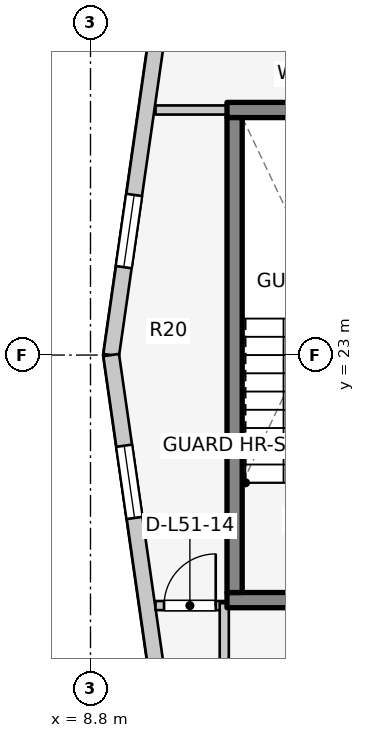
"""IFC4 building model, lengths in metres.
Left out: names, types, materials, properties, quantities, classifications, styles, units other than length and angle.
Written with IfcOpenShell. Run it as: python <this file> out.ifc"""

import sys

from ifc_helpers import new_model, si_unit, direction, frame, frame_2d, origin, place, context, subcontext, project, spatial, rectangle, extrude, element, fill, save


model = new_model("IFC4")
c1 = context("Model", 3, precision=1e-05, world=origin(), true_north=direction((0.0, 1.0)))
c2 = subcontext(c1, "Body", "Model", "MODEL_VIEW")
j1 = project(units=[si_unit("LENGTHUNIT", "METRE"), si_unit("PLANEANGLEUNIT", "RADIAN")], contexts=[c1])
p1 = place(None, origin())
s1 = spatial("IfcSite", under=j1, at=p1, CompositionType="ELEMENT")
p2 = place(p1, origin())
s2 = spatial("IfcBuilding", under=s1, at=p2, CompositionType="ELEMENT")
p3 = place(p2, frame((0.0, 0.0, 168.4)))
s3 = spatial("IfcBuildingStorey", under=s2, at=p3, CompositionType="ELEMENT", Elevation=168.4)
p4 = place(p3, frame((11.045, 18.97, 0.0), z_axis=(0.0, 0.0, 1.0), x_axis=(1.0, 0.0, 0.0)))
e1 = element("IfcWall", 1, at=p4, inside=s3, PredefinedType="SOLIDWALL", context=c2, shape_type="SweptSolid", body=[
    extrude(rectangle(XDim=3.782, YDim=0.25, at=frame_2d((1.891, 0.0))), origin(), (0.0, 0.0, 1.0), 3.1),
])
p5 = place(p4, frame((1.135, 0.0, 0.0)))
e2 = element("IfcOpeningElement", 2, at=p5, cuts=e1, PredefinedType="OPENING", context=c2, shape_type="SweptSolid", body=[
    extrude(rectangle(XDim=1.1, YDim=2.1, at=frame_2d((0.55, 1.05))), frame((0.0, 0.135, 0.0), z_axis=(0.0, -1.0, 0.0), x_axis=(1.0, 0.0, 0.0)), (0.0, 0.0, 1.0), 0.27),
])
p6 = place(p3, frame((11.045, 27.03, 0.0), z_axis=(0.0, 0.0, 1.0), x_axis=(1.0, 0.0, 0.0)))
e3 = element("IfcWall", 3, at=p6, inside=s3, PredefinedType="SOLIDWALL", context=c2, shape_type="SweptSolid", body=[
    extrude(rectangle(XDim=3.782, YDim=0.25, at=frame_2d((1.891, 0.0))), origin(), (0.0, 0.0, 1.0), 3.1),
])
p7 = place(p3, frame((11.17, 19.095, 0.0), z_axis=(0.0, 0.0, 1.0), x_axis=(0.0, 1.0, 0.0)))
e4 = element("IfcWall", 4, at=p7, inside=s3, PredefinedType="SOLIDWALL", context=c2, shape_type="SweptSolid", body=[
    extrude(rectangle(XDim=7.81, YDim=0.25, at=frame_2d((3.905, 0.0))), origin(), (0.0, 0.0, 1.0), 3.1),
])
p8 = place(p3, frame((9.93, 28.497, 0.0), z_axis=(0.0, 0.0, 1.0), x_axis=(-0.142227632286, -0.989833976288, 0.0)))
e5 = element("IfcWall", 5, at=p8, inside=s3, PredefinedType="STANDARD", context=c2, shape_type="SweptSolid", body=[
    extrude(rectangle(XDim=5.553, YDim=0.26, at=frame_2d((2.776, 0.0))), origin(), (0.0, 0.0, 1.0), 2.57),
])
p9 = place(p8, frame((2.892, 0.0, 0.75)))
e6 = element("IfcOpeningElement", 6, at=p9, cuts=e5, PredefinedType="OPENING", context=c2, shape_type="SweptSolid", body=[
    extrude(rectangle(XDim=1.2, YDim=1.5, at=frame_2d((0.6, 0.75))), frame((0.0, 0.14, 0.0), z_axis=(0.0, -1.0, 0.0), x_axis=(1.0, 0.0, 0.0)), (0.0, 0.0, 1.0), 0.28),
])
p10 = place(p3, frame((9.14, 23.0, 0.0), z_axis=(0.0, 0.0, 1.0), x_axis=(0.142227632286, -0.989833976288, 0.0)))
e7 = element("IfcWall", 7, at=p10, inside=s3, PredefinedType="STANDARD", context=c2, shape_type="SweptSolid", body=[
    extrude(rectangle(XDim=5.553, YDim=0.26, at=frame_2d((2.776, 0.0))), origin(), (0.0, 0.0, 1.0), 2.57),
])
p11 = place(p10, frame((1.506, 0.0, 0.75)))
e8 = element("IfcOpeningElement", 8, at=p11, cuts=e7, PredefinedType="OPENING", context=c2, shape_type="SweptSolid", body=[
    extrude(rectangle(XDim=1.2, YDim=1.5, at=frame_2d((0.6, 0.75))), frame((0.0, 0.14, 0.0), z_axis=(0.0, -1.0, 0.0), x_axis=(1.0, 0.0, 0.0)), (0.0, 0.0, 1.0), 0.28),
])
p12 = place(p3, frame((9.87, 27.03, 0.0), z_axis=(0.0, 0.0, 1.0), x_axis=(1.0, 0.0, 0.0)))
e9 = element("IfcWall", 9, at=p12, inside=s3, PredefinedType="PARTITIONING", context=c2, shape_type="SweptSolid", body=[
    extrude(rectangle(XDim=1.17, YDim=0.15, at=frame_2d((0.585, 0.0))), origin(), (0.0, 0.0, 1.0), 2.575),
])
p13 = place(p3, frame((9.87, 18.88, 0.0), z_axis=(0.0, 0.0, 1.0), x_axis=(1.0, 0.0, 0.0)))
e10 = element("IfcWall", 10, at=p13, inside=s3, PredefinedType="PARTITIONING", context=c2, shape_type="SweptSolid", body=[
    extrude(rectangle(XDim=1.17, YDim=0.15, at=frame_2d((0.585, 0.0))), origin(), (0.0, 0.0, 1.0), 2.575),
])
p14 = place(p13, frame((0.14, 0.0, 0.0)))
e11 = element("IfcOpeningElement", 11, at=p14, cuts=e10, PredefinedType="OPENING", context=c2, shape_type="SweptSolid", body=[
    extrude(rectangle(XDim=0.85, YDim=2.05, at=frame_2d((0.425, 1.025))), frame((0.0, 0.085, 0.0), z_axis=(0.0, -1.0, 0.0), x_axis=(1.0, 0.0, 0.0)), (0.0, 0.0, 1.0), 0.17),
])
p15 = place(p3, frame((11.0, 15.91, 0.0), z_axis=(0.0, 0.0, 1.0), x_axis=(0.0, 1.0, 0.0)))
e12 = element("IfcWall", 12, at=p15, inside=s3, PredefinedType="PARTITIONING", context=c2, shape_type="SweptSolid", body=[
    extrude(rectangle(XDim=3.01, YDim=0.15, at=frame_2d((1.505, 0.0))), origin(), (0.0, 0.0, 1.0), 2.575),
])
p16 = place(p9, origin())
e13 = element("IfcWindow", 13, at=p16, inside=s3, PartitioningType="SINGLE_PANEL", PredefinedType="WINDOW", context=c2, shape_type="SweptSolid", body=[
    extrude(rectangle(XDim=1.2, YDim=1.5, at=frame_2d((0.6, 0.75))), frame((0.0, 0.03, 0.0), z_axis=(0.0, -1.0, 0.0), x_axis=(1.0, 0.0, 0.0)), (0.0, 0.0, 1.0), 0.06),
])
fill(e6, e13)
p17 = place(p11, origin())
e14 = element("IfcWindow", 14, at=p17, inside=s3, PartitioningType="SINGLE_PANEL", PredefinedType="WINDOW", context=c2, shape_type="SweptSolid", body=[
    extrude(rectangle(XDim=1.2, YDim=1.5, at=frame_2d((0.6, 0.75))), frame((0.0, 0.03, 0.0), z_axis=(0.0, -1.0, 0.0), x_axis=(1.0, 0.0, 0.0)), (0.0, 0.0, 1.0), 0.06),
])
fill(e8, e14)
p18 = place(p14, origin())
e15 = element("IfcDoor", 15, at=p18, inside=s3, OperationType="SINGLE_SWING_RIGHT", PredefinedType="DOOR", context=c2, shape_type="SweptSolid", body=[
    extrude(rectangle(XDim=0.85, YDim=2.05, at=frame_2d((0.425, 1.025))), frame((0.0, 0.025, 0.0), z_axis=(0.0, -1.0, 0.0), x_axis=(1.0, 0.0, 0.0)), (0.0, 0.0, 1.0), 0.05),
])
fill(e11, e15)
save(model, sys.argv[1])
